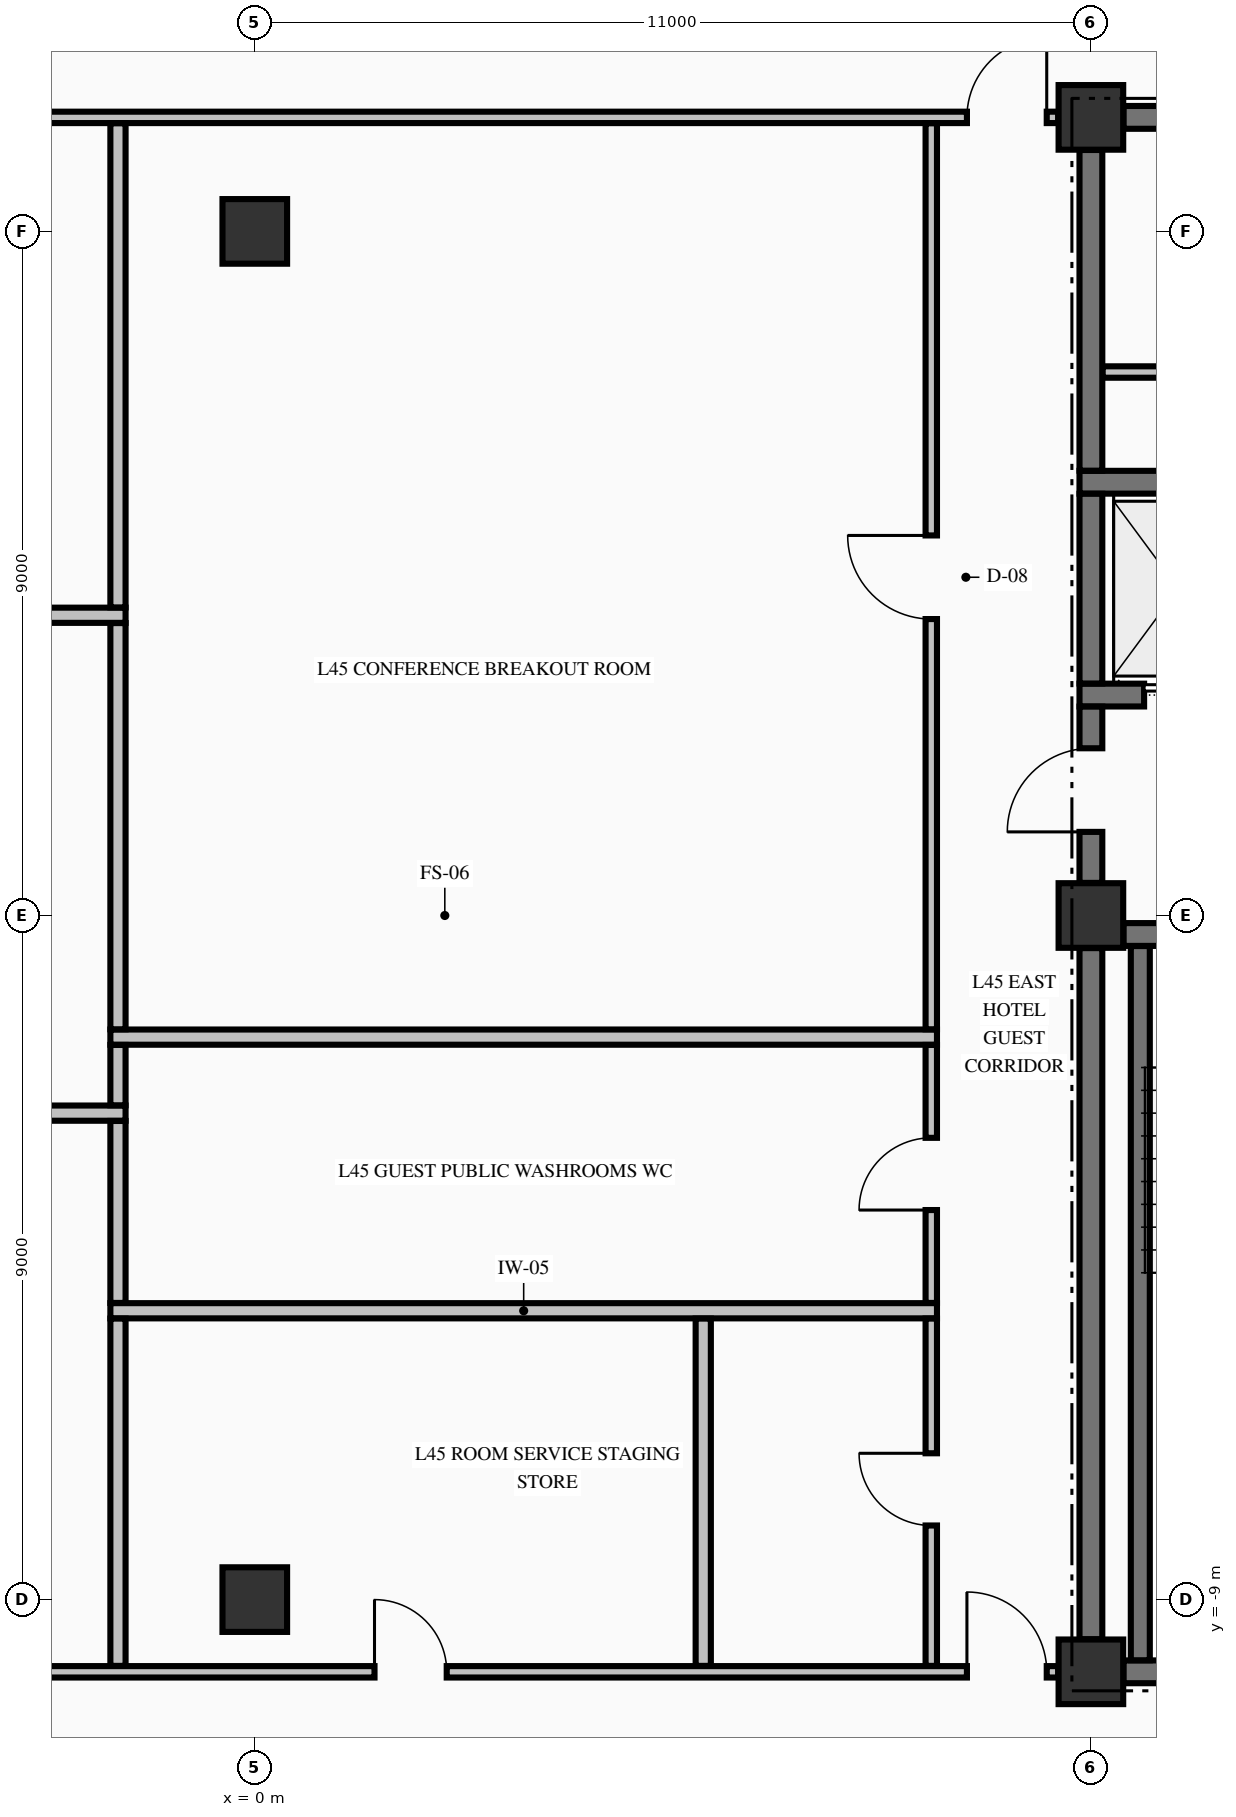
"""IFC4 building model, lengths in metres.
Left out: names, types, materials, properties, quantities, classifications, styles, units other than length and angle.
Written with IfcOpenShell. Run it as: python <this file> out.ifc"""

import sys

from ifc_helpers import new_model, si_unit, direction, frame, frame_2d, origin, origin_2d, place, context, subcontext, project, spatial, rectangle, extrude, element, fill, save


model = new_model("IFC4")
c1 = context("Model", 3, precision=1e-05, world=origin(), true_north=direction((0.0, 1.0)))
c2 = subcontext(c1, "Body", "Model", "MODEL_VIEW")
j1 = project(units=[si_unit("LENGTHUNIT", "METRE"), si_unit("PLANEANGLEUNIT", "RADIAN")], contexts=[c1])
p1 = place(None, origin())
s1 = spatial("IfcSite", under=j1, at=p1, CompositionType="ELEMENT")
p2 = place(p1, origin())
s2 = spatial("IfcBuilding", under=s1, at=p2, CompositionType="ELEMENT")
p3 = place(p2, frame((0.0, 0.0, 176.26)))
s3 = spatial("IfcBuildingStorey", under=s2, at=p3, CompositionType="ELEMENT", Elevation=176.26)
for number, where, z_axis, x_axis in (
    (1, (11.0, -9.95, -0.275), (0.0, 0.0, 1.0), (1.0, 0.0, 0.0)),
    (2, (11.0, 0.0, -0.275), (0.0, 0.0, 1.0), (1.0, 0.0, 0.0)),
    (3, (11.0, 10.5, -0.275), (0.0, 0.0, 1.0), (1.0, 0.0, 0.0)),
    (4, (0.0, -9.0, -0.275), (0.0, 0.0, 1.0), (1.0, 0.0, 0.0)),
    (5, (0.0, 9.0, -0.275), (0.0, 0.0, 1.0), (1.0, 0.0, 0.0)),
):
    element("IfcColumn", number, at=place(p3, frame(where, z_axis=z_axis, x_axis=x_axis)), inside=s3, PredefinedType="COLUMN", context=c2, shape_type="SweptSolid", body=[
        extrude(rectangle(XDim=0.85, YDim=0.85, at=origin_2d()), origin(), (0.0, 0.0, 1.0), 3.425),
    ])
p4 = place(p3, frame((11.429, -9.95, 0.0), z_axis=(0.0, 0.0, 1.0), x_axis=(1.0, 0.0, 0.0)))
e6 = element("IfcWall", 6, at=p4, inside=s3, PredefinedType="SHEAR", context=c2, shape_type="SweptSolid", body=[
    extrude(rectangle(XDim=3.271, YDim=0.3, at=frame_2d((1.635, 0.0))), origin(), (0.0, 0.0, 1.0), 3.15),
])
p5 = place(p3, frame((11.429, -0.25, 0.0), z_axis=(0.0, 0.0, 1.0), x_axis=(1.0, 0.0, 0.0)))
e7 = element("IfcWall", 7, at=p5, inside=s3, PredefinedType="SHEAR", context=c2, shape_type="SweptSolid", body=[
    extrude(rectangle(XDim=3.446, YDim=0.3, at=frame_2d((1.723, 0.0))), origin(), (0.0, 0.0, 1.0), 3.15),
])
p6 = place(p5, frame((1.171, 0.0, 0.0)))
e8 = element("IfcOpeningElement", 8, at=p6, cuts=e7, PredefinedType="OPENING", context=c2, shape_type="SweptSolid", body=[
    extrude(rectangle(XDim=1.1, YDim=2.15, at=frame_2d((0.55, 1.075))), frame((0.0, 0.16, 0.0), z_axis=(0.0, -1.0, 0.0), x_axis=(1.0, 0.0, 0.0)), (0.0, 0.0, 1.0), 0.32),
])
p7 = place(p3, frame((10.85, 2.9, 0.0), z_axis=(0.0, 0.0, 1.0), x_axis=(1.0, 0.0, 0.0)))
e9 = element("IfcWall", 9, at=p7, inside=s3, PredefinedType="SHEAR", context=c2, shape_type="SweptSolid", body=[
    extrude(rectangle(XDim=4.025, YDim=0.3, at=frame_2d((2.012, 0.0))), origin(), (0.0, 0.0, 1.0), 3.15),
])
p8 = place(p7, frame((0.85, 0.0, 0.0)))
e10 = element("IfcOpeningElement", 10, at=p8, cuts=e9, PredefinedType="OPENING", context=c2, shape_type="SweptSolid", body=[
    extrude(rectangle(XDim=1.1, YDim=2.2, at=frame_2d((0.55, 1.1))), frame((0.0, 0.16, 0.0), z_axis=(0.0, -1.0, 0.0), x_axis=(1.0, 0.0, 0.0)), (0.0, 0.0, 1.0), 0.32),
])
p9 = place(p3, frame((10.85, 5.7, 0.0), z_axis=(0.0, 0.0, 1.0), x_axis=(1.0, 0.0, 0.0)))
e11 = element("IfcWall", 11, at=p9, inside=s3, PredefinedType="SHEAR", context=c2, shape_type="SweptSolid", body=[
    extrude(rectangle(XDim=4.025, YDim=0.3, at=frame_2d((2.012, 0.0))), origin(), (0.0, 0.0, 1.0), 3.15),
])
p10 = place(p3, frame((11.429, 10.5, 0.0), z_axis=(0.0, 0.0, 1.0), x_axis=(1.0, 0.0, 0.0)))
e12 = element("IfcWall", 12, at=p10, inside=s3, PredefinedType="SHEAR", context=c2, shape_type="SweptSolid", body=[
    extrude(rectangle(XDim=3.271, YDim=0.3, at=frame_2d((1.635, 0.0))), origin(), (0.0, 0.0, 1.0), 3.15),
])
p11 = place(p10, frame((2.016, 0.0, 0.0)))
e13 = element("IfcOpeningElement", 13, at=p11, cuts=e12, PredefinedType="OPENING", context=c2, shape_type="SweptSolid", body=[
    extrude(rectangle(XDim=0.95, YDim=2.15, at=frame_2d((0.475, 1.075))), frame((0.0, 0.16, 0.0), z_axis=(0.0, -1.0, 0.0), x_axis=(1.0, 0.0, 0.0)), (0.0, 0.0, 1.0), 0.32),
])
p12 = place(p3, frame((-10.569, -9.95, 0.0), z_axis=(0.0, 0.0, 1.0), x_axis=(1.0, 0.0, 0.0)))
e14 = element("IfcWall", 14, at=p12, inside=s3, PredefinedType="PARTITIONING", context=c2, shape_type="SweptSolid", body=[
    extrude(rectangle(XDim=21.138, YDim=0.15, at=frame_2d((10.569, 0.0))), origin(), (0.0, 0.0, 1.0), 3.15),
])
p13 = place(p12, frame((0.15, 0.0, 0.0)))
e15 = element("IfcOpeningElement", 15, at=p13, cuts=e14, PredefinedType="OPENING", context=c2, shape_type="SweptSolid", body=[
    extrude(rectangle(XDim=1.05, YDim=2.15, at=frame_2d((0.525, 1.075))), frame((0.0, 0.085, 0.0), z_axis=(0.0, -1.0, 0.0), x_axis=(1.0, 0.0, 0.0)), (0.0, 0.0, 1.0), 0.17),
])
p14 = place(p12, frame((19.938, 0.0, 0.0)))
e16 = element("IfcOpeningElement", 16, at=p14, cuts=e14, PredefinedType="OPENING", context=c2, shape_type="SweptSolid", body=[
    extrude(rectangle(XDim=1.05, YDim=2.15, at=frame_2d((0.525, 1.075))), frame((0.0, 0.085, 0.0), z_axis=(0.0, -1.0, 0.0), x_axis=(1.0, 0.0, 0.0)), (0.0, 0.0, 1.0), 0.17),
])
p15 = place(p12, frame((12.144, 0.0, 0.0)))
e17 = element("IfcOpeningElement", 17, at=p15, cuts=e14, PredefinedType="OPENING", context=c2, shape_type="SweptSolid", body=[
    extrude(rectangle(XDim=0.95, YDim=2.15, at=frame_2d((0.475, 1.075))), frame((0.0, 0.085, 0.0), z_axis=(0.0, -1.0, 0.0), x_axis=(1.0, 0.0, 0.0)), (0.0, 0.0, 1.0), 0.17),
])
p16 = place(p3, frame((-1.9, -5.2, 0.0), z_axis=(0.0, 0.0, 1.0), x_axis=(1.0, 0.0, 0.0)))
e18 = element("IfcWall", 18, at=p16, inside=s3, PredefinedType="PARTITIONING", context=c2, shape_type="SweptSolid", body=[
    extrude(rectangle(XDim=10.875, YDim=0.2, at=frame_2d((5.438, 0.0))), origin(), (0.0, 0.0, 1.0), 3.15),
])
p17 = place(p3, frame((-8.975, -2.6, 0.0), z_axis=(0.0, 0.0, 1.0), x_axis=(1.0, 0.0, 0.0)))
e19 = element("IfcWall", 19, at=p17, inside=s3, PredefinedType="PARTITIONING", context=c2, shape_type="SweptSolid", body=[
    extrude(rectangle(XDim=7.275, YDim=0.2, at=frame_2d((3.638, 0.0))), origin(), (0.0, 0.0, 1.0), 3.15),
])
p18 = place(p3, frame((-1.9, -1.6, 0.0), z_axis=(0.0, 0.0, 1.0), x_axis=(1.0, 0.0, 0.0)))
e20 = element("IfcWall", 20, at=p18, inside=s3, PredefinedType="PARTITIONING", context=c2, shape_type="SweptSolid", body=[
    extrude(rectangle(XDim=10.875, YDim=0.2, at=frame_2d((5.438, 0.0))), origin(), (0.0, 0.0, 1.0), 3.15),
])
p19 = place(p3, frame((-8.975, 3.95, 0.0), z_axis=(0.0, 0.0, 1.0), x_axis=(1.0, 0.0, 0.0)))
e21 = element("IfcWall", 21, at=p19, inside=s3, PredefinedType="PARTITIONING", context=c2, shape_type="SweptSolid", body=[
    extrude(rectangle(XDim=7.275, YDim=0.2, at=frame_2d((3.638, 0.0))), origin(), (0.0, 0.0, 1.0), 3.15),
])
p20 = place(p3, frame((11.153, 7.15, 0.0), z_axis=(0.0, 0.0, 1.0), x_axis=(1.0, 0.0, 0.0)))
e22 = element("IfcWall", 22, at=p20, inside=s3, PredefinedType="PARTITIONING", context=c2, shape_type="SweptSolid", body=[
    extrude(rectangle(XDim=2.072, YDim=0.15, at=frame_2d((1.036, 0.0))), origin(), (0.0, 0.0, 1.0), 3.15),
])
p21 = place(p3, frame((-10.569, 10.5, 0.0), z_axis=(0.0, 0.0, 1.0), x_axis=(1.0, 0.0, 0.0)))
e23 = element("IfcWall", 23, at=p21, inside=s3, PredefinedType="PARTITIONING", context=c2, shape_type="SweptSolid", body=[
    extrude(rectangle(XDim=21.138, YDim=0.15, at=frame_2d((10.569, 0.0))), origin(), (0.0, 0.0, 1.0), 3.15),
])
p22 = place(p21, frame((0.15, 0.0, 0.0)))
e24 = element("IfcOpeningElement", 24, at=p22, cuts=e23, PredefinedType="OPENING", context=c2, shape_type="SweptSolid", body=[
    extrude(rectangle(XDim=1.05, YDim=2.15, at=frame_2d((0.525, 1.075))), frame((0.0, 0.085, 0.0), z_axis=(0.0, -1.0, 0.0), x_axis=(1.0, 0.0, 0.0)), (0.0, 0.0, 1.0), 0.17),
])
p23 = place(p21, frame((19.938, 0.0, 0.0)))
e25 = element("IfcOpeningElement", 25, at=p23, cuts=e23, PredefinedType="OPENING", context=c2, shape_type="SweptSolid", body=[
    extrude(rectangle(XDim=1.05, YDim=2.15, at=frame_2d((0.525, 1.075))), frame((0.0, 0.085, 0.0), z_axis=(0.0, -1.0, 0.0), x_axis=(1.0, 0.0, 0.0)), (0.0, 0.0, 1.0), 0.17),
])
p24 = place(p3, frame((11.0, -9.521, 0.0), z_axis=(0.0, 0.0, 1.0), x_axis=(0.0, 1.0, 0.0)))
e26 = element("IfcWall", 26, at=p24, inside=s3, PredefinedType="SHEAR", context=c2, shape_type="SweptSolid", body=[
    extrude(rectangle(XDim=9.092, YDim=0.3, at=frame_2d((4.546, 0.0))), origin(), (0.0, 0.0, 1.0), 3.15),
])
p25 = place(p3, frame((11.0, 0.429, 0.0), z_axis=(0.0, 0.0, 1.0), x_axis=(0.0, 1.0, 0.0)))
e27 = element("IfcWall", 27, at=p25, inside=s3, PredefinedType="SHEAR", context=c2, shape_type="SweptSolid", body=[
    extrude(rectangle(XDim=2.319, YDim=0.3, at=frame_2d((1.16, 0.0))), origin(), (0.0, 0.0, 1.0), 3.15),
])
p26 = place(p25, frame((0.671, 0.0, 0.0)))
e28 = element("IfcOpeningElement", 28, at=p26, cuts=e27, PredefinedType="OPENING", context=c2, shape_type="SweptSolid", body=[
    extrude(rectangle(XDim=1.1, YDim=2.15, at=frame_2d((0.55, 1.075))), frame((0.0, 0.16, 0.0), z_axis=(0.0, -1.0, 0.0), x_axis=(1.0, 0.0, 0.0)), (0.0, 0.0, 1.0), 0.32),
])
p27 = place(p3, frame((11.0, 3.052, 0.0), z_axis=(0.0, 0.0, 1.0), x_axis=(0.0, 1.0, 0.0)))
e29 = element("IfcWall", 29, at=p27, inside=s3, PredefinedType="SHEAR", context=c2, shape_type="SweptSolid", body=[
    extrude(rectangle(XDim=2.496, YDim=0.3, at=frame_2d((1.248, 0.0))), origin(), (0.0, 0.0, 1.0), 3.15),
])
p28 = place(p3, frame((11.0, 5.852, 0.0), z_axis=(0.0, 0.0, 1.0), x_axis=(0.0, 1.0, 0.0)))
e30 = element("IfcWall", 30, at=p28, inside=s3, PredefinedType="SHEAR", context=c2, shape_type="SweptSolid", body=[
    extrude(rectangle(XDim=4.219, YDim=0.3, at=frame_2d((2.109, 0.0))), origin(), (0.0, 0.0, 1.0), 3.15),
])
p29 = place(p3, frame((11.65, -9.798, 0.0), z_axis=(0.0, 0.0, 1.0), x_axis=(0.0, 1.0, 0.0)))
e31 = element("IfcWall", 31, at=p29, inside=s3, PredefinedType="SOLIDWALL", context=c2, shape_type="SweptSolid", body=[
    extrude(rectangle(XDim=9.396, YDim=0.25, at=frame_2d((4.698, 0.0))), origin(), (0.0, 0.0, 1.0), 3.15),
])
p30 = place(p3, frame((-1.8, -9.872, 0.0), z_axis=(0.0, 0.0, 1.0), x_axis=(0.0, 1.0, 0.0)))
e32 = element("IfcWall", 32, at=p30, inside=s3, PredefinedType="PARTITIONING", context=c2, shape_type="SweptSolid", body=[
    extrude(rectangle(XDim=4.569, YDim=0.2, at=frame_2d((2.285, 0.0))), origin(), (0.0, 0.0, 1.0), 3.15),
])
p31 = place(p3, frame((-1.8, -5.097, 0.0), z_axis=(0.0, 0.0, 1.0), x_axis=(0.0, 1.0, 0.0)))
e33 = element("IfcWall", 33, at=p31, inside=s3, PredefinedType="PARTITIONING", context=c2, shape_type="SweptSolid", body=[
    extrude(rectangle(XDim=2.394, YDim=0.2, at=frame_2d((1.197, 0.0))), origin(), (0.0, 0.0, 1.0), 3.15),
])
p32 = place(p3, frame((-1.8, -2.497, 0.0), z_axis=(0.0, 0.0, 1.0), x_axis=(0.0, 1.0, 0.0)))
e34 = element("IfcWall", 34, at=p32, inside=s3, PredefinedType="PARTITIONING", context=c2, shape_type="SweptSolid", body=[
    extrude(rectangle(XDim=0.794, YDim=0.2, at=frame_2d((0.397, 0.0))), origin(), (0.0, 0.0, 1.0), 3.15),
])
p33 = place(p3, frame((-1.8, -1.497, 0.0), z_axis=(0.0, 0.0, 1.0), x_axis=(0.0, 1.0, 0.0)))
e35 = element("IfcWall", 35, at=p33, inside=s3, PredefinedType="PARTITIONING", context=c2, shape_type="SweptSolid", body=[
    extrude(rectangle(XDim=5.344, YDim=0.2, at=frame_2d((2.672, 0.0))), origin(), (0.0, 0.0, 1.0), 3.15),
])
p34 = place(p3, frame((-1.8, 4.053, 0.0), z_axis=(0.0, 0.0, 1.0), x_axis=(0.0, 1.0, 0.0)))
e36 = element("IfcWall", 36, at=p34, inside=s3, PredefinedType="PARTITIONING", context=c2, shape_type="SweptSolid", body=[
    extrude(rectangle(XDim=6.369, YDim=0.2, at=frame_2d((3.185, 0.0))), origin(), (0.0, 0.0, 1.0), 3.15),
])
p35 = place(p3, frame((5.9, -9.872, 0.0), z_axis=(0.0, 0.0, 1.0), x_axis=(0.0, 1.0, 0.0)))
e37 = element("IfcWall", 37, at=p35, inside=s3, PredefinedType="PARTITIONING", context=c2, shape_type="SweptSolid", body=[
    extrude(rectangle(XDim=4.569, YDim=0.2, at=frame_2d((2.285, 0.0))), origin(), (0.0, 0.0, 1.0), 3.15),
])
p36 = place(p3, frame((8.9, -9.872, 0.0), z_axis=(0.0, 0.0, 1.0), x_axis=(0.0, 1.0, 0.0)))
e38 = element("IfcWall", 38, at=p36, inside=s3, PredefinedType="PARTITIONING", context=c2, shape_type="SweptSolid", body=[
    extrude(rectangle(XDim=4.569, YDim=0.15, at=frame_2d((2.285, 0.0))), origin(), (0.0, 0.0, 1.0), 3.15),
])
p37 = place(p36, frame((1.847, 0.0, 0.0)))
e39 = element("IfcOpeningElement", 39, at=p37, cuts=e38, PredefinedType="OPENING", context=c2, shape_type="SweptSolid", body=[
    extrude(rectangle(XDim=0.95, YDim=2.15, at=frame_2d((0.475, 1.075))), frame((0.0, 0.085, 0.0), z_axis=(0.0, -1.0, 0.0), x_axis=(1.0, 0.0, 0.0)), (0.0, 0.0, 1.0), 0.17),
])
p38 = place(p3, frame((8.9, -5.097, 0.0), z_axis=(0.0, 0.0, 1.0), x_axis=(0.0, 1.0, 0.0)))
e40 = element("IfcWall", 40, at=p38, inside=s3, PredefinedType="PARTITIONING", context=c2, shape_type="SweptSolid", body=[
    extrude(rectangle(XDim=3.394, YDim=0.15, at=frame_2d((1.697, 0.0))), origin(), (0.0, 0.0, 1.0), 3.15),
])
p39 = place(p38, frame((1.222, 0.0, 0.0)))
e41 = element("IfcOpeningElement", 41, at=p39, cuts=e40, PredefinedType="OPENING", context=c2, shape_type="SweptSolid", body=[
    extrude(rectangle(XDim=0.95, YDim=2.15, at=frame_2d((0.475, 1.075))), frame((0.0, 0.085, 0.0), z_axis=(0.0, -1.0, 0.0), x_axis=(1.0, 0.0, 0.0)), (0.0, 0.0, 1.0), 0.17),
])
p40 = place(p3, frame((8.9, -1.497, 0.0), z_axis=(0.0, 0.0, 1.0), x_axis=(0.0, 1.0, 0.0)))
e42 = element("IfcWall", 42, at=p40, inside=s3, PredefinedType="PARTITIONING", context=c2, shape_type="SweptSolid", body=[
    extrude(rectangle(XDim=11.919, YDim=0.15, at=frame_2d((5.959, 0.0))), origin(), (0.0, 0.0, 1.0), 3.15),
])
p41 = place(p40, frame((5.397, 0.0, 0.0)))
e43 = element("IfcOpeningElement", 43, at=p41, cuts=e42, PredefinedType="OPENING", context=c2, shape_type="SweptSolid", body=[
    extrude(rectangle(XDim=1.1, YDim=2.15, at=frame_2d((0.55, 1.075))), frame((0.0, 0.085, 0.0), z_axis=(0.0, -1.0, 0.0), x_axis=(1.0, 0.0, 0.0)), (0.0, 0.0, 1.0), 0.17),
])
p42 = place(p26, origin())
e44 = element("IfcDoor", 44, at=p42, inside=s3, OperationType="SINGLE_SWING_LEFT", PredefinedType="DOOR", context=c2, shape_type="SweptSolid", body=[
    extrude(rectangle(XDim=1.1, YDim=2.15, at=frame_2d((0.55, 1.075))), frame((0.0, 0.025, 0.0), z_axis=(0.0, -1.0, 0.0), x_axis=(1.0, 0.0, 0.0)), (0.0, 0.0, 1.0), 0.05),
])
fill(e28, e44)
p43 = place(p8, origin())
e45 = element("IfcDoor", 45, at=p43, inside=s3, OperationType="SLIDING_TO_RIGHT", PredefinedType="DOOR", context=c2, shape_type="SweptSolid", body=[
    extrude(rectangle(XDim=1.1, YDim=2.2, at=frame_2d((0.55, 1.1))), frame((0.0, 0.025, 0.0), z_axis=(0.0, -1.0, 0.0), x_axis=(1.0, 0.0, 0.0)), (0.0, 0.0, 1.0), 0.05),
])
fill(e10, e45)
p44 = place(p23, origin())
e46 = element("IfcDoor", 46, at=p44, inside=s3, OperationType="SINGLE_SWING_RIGHT", PredefinedType="DOOR", context=c2, shape_type="SweptSolid", body=[
    extrude(rectangle(XDim=1.05, YDim=2.15, at=frame_2d((0.525, 1.075))), frame((0.0, 0.025, 0.0), z_axis=(0.0, -1.0, 0.0), x_axis=(1.0, 0.0, 0.0)), (0.0, 0.0, 1.0), 0.05),
])
fill(e25, e46)
p45 = place(p14, origin())
e47 = element("IfcDoor", 47, at=p45, inside=s3, OperationType="SINGLE_SWING_LEFT", PredefinedType="DOOR", context=c2, shape_type="SweptSolid", body=[
    extrude(rectangle(XDim=1.05, YDim=2.15, at=frame_2d((0.525, 1.075))), frame((0.0, 0.025, 0.0), z_axis=(0.0, -1.0, 0.0), x_axis=(1.0, 0.0, 0.0)), (0.0, 0.0, 1.0), 0.05),
])
fill(e16, e47)
p46 = place(p41, origin())
e48 = element("IfcDoor", 48, at=p46, inside=s3, OperationType="SINGLE_SWING_RIGHT", PredefinedType="DOOR", context=c2, shape_type="SweptSolid", body=[
    extrude(rectangle(XDim=1.1, YDim=2.15, at=frame_2d((0.55, 1.075))), frame((0.0, 0.025, 0.0), z_axis=(0.0, -1.0, 0.0), x_axis=(1.0, 0.0, 0.0)), (0.0, 0.0, 1.0), 0.05),
])
fill(e43, e48)
p47 = place(p39, origin())
e49 = element("IfcDoor", 49, at=p47, inside=s3, OperationType="SINGLE_SWING_LEFT", PredefinedType="DOOR", context=c2, shape_type="SweptSolid", body=[
    extrude(rectangle(XDim=0.95, YDim=2.15, at=frame_2d((0.475, 1.075))), frame((0.0, 0.025, 0.0), z_axis=(0.0, -1.0, 0.0), x_axis=(1.0, 0.0, 0.0)), (0.0, 0.0, 1.0), 0.05),
])
fill(e41, e49)
p48 = place(p37, origin())
e50 = element("IfcDoor", 50, at=p48, inside=s3, OperationType="SINGLE_SWING_RIGHT", PredefinedType="DOOR", context=c2, shape_type="SweptSolid", body=[
    extrude(rectangle(XDim=0.95, YDim=2.15, at=frame_2d((0.475, 1.075))), frame((0.0, 0.025, 0.0), z_axis=(0.0, -1.0, 0.0), x_axis=(1.0, 0.0, 0.0)), (0.0, 0.0, 1.0), 0.05),
])
fill(e39, e50)
p49 = place(p15, origin())
e51 = element("IfcDoor", 51, at=p49, inside=s3, OperationType="SINGLE_SWING_LEFT", PredefinedType="DOOR", context=c2, shape_type="SweptSolid", body=[
    extrude(rectangle(XDim=0.95, YDim=2.15, at=frame_2d((0.475, 1.075))), frame((0.0, 0.025, 0.0), z_axis=(0.0, -1.0, 0.0), x_axis=(1.0, 0.0, 0.0)), (0.0, 0.0, 1.0), 0.05),
])
fill(e17, e51)
save(model, sys.argv[1])
